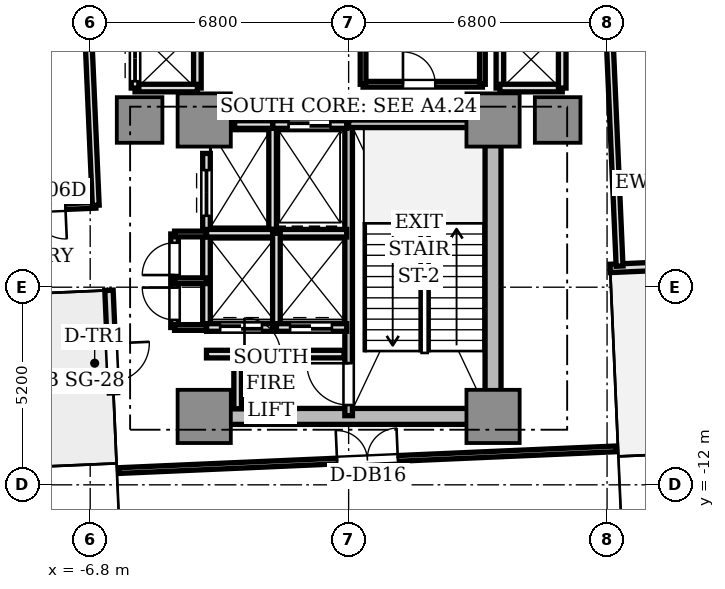
"""IFC4 building model, lengths in metres.
Left out: names, types, materials, properties, quantities, classifications, styles, units other than length and angle.
Written with IfcOpenShell. Run it as: python <this file> out.ifc"""

import sys

from ifc_helpers import new_model, si_unit, direction, frame, frame_2d, origin, origin_2d, place, context, subcontext, project, spatial, rectangle, extrude, source, transform, mapped, element, fill, save


model = new_model("IFC4")
c1 = context("Model", 3, precision=1e-05, world=origin(), true_north=direction((0.0, 1.0)))
c2 = subcontext(c1, "Body", "Model", "MODEL_VIEW")
j1 = project(units=[si_unit("LENGTHUNIT", "METRE"), si_unit("PLANEANGLEUNIT", "RADIAN")], contexts=[c1])
p1 = place(None, origin())
s1 = spatial("IfcSite", under=j1, at=p1, CompositionType="ELEMENT")
p2 = place(p1, origin())
s2 = spatial("IfcBuilding", under=s1, at=p2, CompositionType="ELEMENT")
p3 = place(p2, frame((0.0, 0.0, 106.95)))
s3 = spatial("IfcBuildingStorey", under=s2, at=p3, CompositionType="ELEMENT", Elevation=106.95)
p4 = place(p3, frame((-3.55, -10.2, 0.0), z_axis=(0.0, 0.0, 1.0), x_axis=(1.0, 0.0, 0.0)))
e1 = element("IfcWall", 1, at=p4, inside=s3, PredefinedType="SHEAR", context=c2, shape_type="SweptSolid", body=[
    extrude(rectangle(XDim=7.1, YDim=0.42, at=frame_2d((3.55, 0.0))), origin(), (0.0, 0.0, 1.0), 4.26),
])
p5 = place(p3, frame((3.8, -9.75, 0.0), z_axis=(0.0, 0.0, 1.0), x_axis=(0.0, 1.0, 0.0)))
e2 = element("IfcWall", 2, at=p5, inside=s3, PredefinedType="SHEAR", context=c2, shape_type="SweptSolid", body=[
    extrude(rectangle(XDim=6.9, YDim=0.42, at=frame_2d((3.45, 0.0))), origin(), (0.0, 0.0, 1.0), 4.26),
])
m1 = source(origin(), c2, "Body", "SweptSolid", [
    extrude(rectangle(XDim=1.4, YDim=1.4, at=origin_2d()), origin(), (0.0, 0.0, 1.0), 4.26),
])
for number, where, z_axis, x_axis in (
    (3, (-3.8, -2.4, 0.0), (0.0, 0.0, 1.0), (1.0, 0.0, 0.0)),
    (4, (3.8, -2.4, 0.0), (0.0, 0.0, 1.0), (1.0, 0.0, 0.0)),
    (5, (-3.8, -10.2, 0.0), (0.0, 0.0, 1.0), (1.0, 0.0, 0.0)),
    (6, (3.8, -10.2, 0.0), (0.0, 0.0, 1.0), (1.0, 0.0, 0.0)),
):
    element("IfcColumn", number, at=place(p3, frame(where, z_axis=z_axis, x_axis=x_axis)), inside=s3, PredefinedType="COLUMN", context=c2, shape_type="MappedRepresentation", body=[
        mapped(m1, transform((0.0, 0.0, 0.0), scale=1.0)),
    ])
m2 = source(origin(), c2, "Body", "SweptSolid", [
    extrude(rectangle(XDim=1.2, YDim=1.2, at=origin_2d()), origin(), (0.0, 0.0, 1.0), 4.26),
])
for number, where, z_axis, x_axis in (
    (7, (5.5, -2.4, 0.0), (0.0, 0.0, 1.0), (1.0, 0.0, 0.0)),
    (8, (-5.5, -2.4, 0.0), (0.0, 0.0, 1.0), (1.0, 0.0, 0.0)),
):
    element("IfcColumn", number, at=place(p3, frame(where, z_axis=z_axis, x_axis=x_axis)), inside=s3, PredefinedType="COLUMN", context=c2, shape_type="MappedRepresentation", body=[
        mapped(m2, transform((0.0, 0.0, 0.0), scale=1.0)),
    ])
p6 = place(p3, frame((6.882, -6.306, 0.0), z_axis=(0.0, 0.0, 1.0), x_axis=(0.999045894436, 0.043672655174, 0.0)))
e9 = element("IfcWall", 9, at=p6, inside=s3, PredefinedType="STANDARD", context=c2, shape_type="SweptSolid", body=[
    extrude(rectangle(XDim=2.7, YDim=0.22, at=frame_2d((1.35, 0.0))), origin(), (0.0, 0.0, 1.0), 4.26),
])
p7 = place(p6, frame((1.4, 0.0, 0.0)))
e10 = element("IfcOpeningElement", 10, at=p7, cuts=e9, PredefinedType="OPENING", context=c2, shape_type="SweptSolid", body=[
    extrude(rectangle(XDim=1.0, YDim=2.2, at=frame_2d((0.5, 1.1))), frame((0.0, 0.12, 0.0), z_axis=(0.0, -1.0, 0.0), x_axis=(1.0, 0.0, 0.0)), (0.0, 0.0, 1.0), 0.24),
])
p8 = place(p3, frame((-6.306, -6.882, 0.0), z_axis=(0.0, 0.0, 1.0), x_axis=(0.043672655174, -0.999045894436, 0.0)))
e11 = element("IfcWall", 11, at=p8, inside=s3, PredefinedType="STANDARD", context=c2, shape_type="SweptSolid", body=[
    extrude(rectangle(XDim=2.7, YDim=0.22, at=frame_2d((1.35, 0.0))), origin(), (0.0, 0.0, 1.0), 4.26),
])
p9 = place(p8, frame((1.4, 0.0, 0.0)))
e12 = element("IfcOpeningElement", 12, at=p9, cuts=e11, PredefinedType="OPENING", context=c2, shape_type="SweptSolid", body=[
    extrude(rectangle(XDim=1.0, YDim=2.2, at=frame_2d((0.5, 1.1))), frame((0.0, 0.12, 0.0), z_axis=(0.0, -1.0, 0.0), x_axis=(1.0, 0.0, 0.0)), (0.0, 0.0, 1.0), 0.24),
])
p10 = place(p3, frame((0.0, -10.18, 0.0), z_axis=(0.0, 0.0, 1.0), x_axis=(0.0, 1.0, 0.0)))
e13 = element("IfcWall", 13, at=p10, inside=s3, PredefinedType="SOLIDWALL", context=c2, shape_type="SweptSolid", body=[
    extrude(rectangle(XDim=7.68, YDim=0.2, at=frame_2d((3.84, 0.0))), origin(), (0.0, 0.0, 1.0), 4.26),
])
p11 = place(p10, frame((0.28, 0.0, 0.0)))
e14 = element("IfcOpeningElement", 14, at=p11, cuts=e13, PredefinedType="OPENING", context=c2, shape_type="SweptSolid", body=[
    extrude(rectangle(XDim=1.1, YDim=2.15, at=frame_2d((0.55, 1.075))), frame((0.0, 0.11, 0.0), z_axis=(0.0, -1.0, 0.0), x_axis=(1.0, 0.0, 0.0)), (0.0, 0.0, 1.0), 0.22),
])
p12 = place(p3, frame((0.0, -2.5, 0.0), z_axis=(0.0, 0.0, 1.0), x_axis=(1.0, 0.0, 0.0)))
e15 = element("IfcWall", 15, at=p12, inside=s3, PredefinedType="SOLIDWALL", context=c2, shape_type="SweptSolid", body=[
    extrude(rectangle(XDim=3.72, YDim=0.2, at=frame_2d((1.86, 0.0))), origin(), (0.0, 0.0, 1.0), 4.26),
])
p13 = place(p3, frame((-2.0, -5.28, 0.0), z_axis=(0.0, 0.0, 1.0), x_axis=(0.0, 1.0, 0.0)))
e16 = element("IfcWall", 16, at=p13, inside=s3, PredefinedType="SOLIDWALL", context=c2, shape_type="SweptSolid", body=[
    extrude(rectangle(XDim=2.78, YDim=0.2, at=frame_2d((1.39, 0.0))), origin(), (0.0, 0.0, 1.0), 3.81),
])
p14 = place(p3, frame((-2.0, -2.52, 0.0), z_axis=(0.0, 0.0, 1.0), x_axis=(1.0, 0.0, 0.0)))
e17 = element("IfcWall", 17, at=p14, inside=s3, PredefinedType="SOLIDWALL", context=c2, shape_type="SweptSolid", body=[
    extrude(rectangle(XDim=1.95, YDim=0.2, at=frame_2d((0.975, 0.0))), origin(), (0.0, 0.0, 1.0), 3.81),
])
p15 = place(p14, frame((0.42, 0.0, 0.0)))
e18 = element("IfcOpeningElement", 18, at=p15, cuts=e17, PredefinedType="OPENING", context=c2, shape_type="SweptSolid", body=[
    extrude(rectangle(XDim=1.1, YDim=2.2, at=frame_2d((0.55, 1.1))), frame((0.0, 0.11, 0.0), z_axis=(0.0, -1.0, 0.0), x_axis=(1.0, 0.0, 0.0)), (0.0, 0.0, 1.0), 0.22),
])
p16 = place(p3, frame((-3.0, -2.52, 0.0), z_axis=(0.0, 0.0, 1.0), x_axis=(1.0, 0.0, 0.0)))
e19 = element("IfcWall", 19, at=p16, inside=s3, PredefinedType="SOLIDWALL", context=c2, shape_type="SweptSolid", body=[
    extrude(rectangle(XDim=1.0, YDim=0.2, at=frame_2d((0.5, 0.0))), origin(), (0.0, 0.0, 1.0), 3.81),
])
p17 = place(p3, frame((-3.74, -5.36, 0.0), z_axis=(0.0, 0.0, 1.0), x_axis=(0.0, 1.0, 0.0)))
e20 = element("IfcWall", 20, at=p17, inside=s3, PredefinedType="SOLIDWALL", context=c2, shape_type="SweptSolid", body=[
    extrude(rectangle(XDim=2.08, YDim=0.2, at=frame_2d((1.04, 0.0))), origin(), (0.0, 0.0, 1.0), 3.81),
])
p18 = place(p17, frame((0.44, 0.0, 0.0)))
e21 = element("IfcOpeningElement", 21, at=p18, cuts=e20, PredefinedType="OPENING", context=c2, shape_type="SweptSolid", body=[
    extrude(rectangle(XDim=1.2, YDim=2.2, at=frame_2d((0.6, 1.1))), frame((0.0, 0.11, 0.0), z_axis=(0.0, -1.0, 0.0), x_axis=(1.0, 0.0, 0.0)), (0.0, 0.0, 1.0), 0.22),
])
p19 = place(p3, frame((-3.74, -7.86, 0.0), z_axis=(0.0, 0.0, 1.0), x_axis=(0.0, 1.0, 0.0)))
e22 = element("IfcWall", 22, at=p19, inside=s3, PredefinedType="SOLIDWALL", context=c2, shape_type="SweptSolid", body=[
    extrude(rectangle(XDim=2.48, YDim=0.2, at=frame_2d((1.24, 0.0))), origin(), (0.0, 0.0, 1.0), 3.81),
])
p20 = place(p3, frame((-3.74, -7.86, 0.0), z_axis=(0.0, 0.0, 1.0), x_axis=(1.0, 0.0, 0.0)))
e23 = element("IfcWall", 23, at=p20, inside=s3, PredefinedType="SOLIDWALL", context=c2, shape_type="SweptSolid", body=[
    extrude(rectangle(XDim=1.84, YDim=0.2, at=frame_2d((0.92, 0.0))), origin(), (0.0, 0.0, 1.0), 3.81),
])
p21 = place(p20, frame((0.36, 0.0, 0.0)))
e24 = element("IfcOpeningElement", 24, at=p21, cuts=e23, PredefinedType="OPENING", context=c2, shape_type="SweptSolid", body=[
    extrude(rectangle(XDim=1.1, YDim=2.2, at=frame_2d((0.55, 1.1))), frame((0.0, 0.11, 0.0), z_axis=(0.0, -1.0, 0.0), x_axis=(1.0, 0.0, 0.0)), (0.0, 0.0, 1.0), 0.22),
])
p22 = place(p3, frame((-3.74, -5.38, 0.0), z_axis=(0.0, 0.0, 1.0), x_axis=(1.0, 0.0, 0.0)))
e25 = element("IfcWall", 25, at=p22, inside=s3, PredefinedType="SOLIDWALL", context=c2, shape_type="SweptSolid", body=[
    extrude(rectangle(XDim=3.69, YDim=0.2, at=frame_2d((1.845, 0.0))), origin(), (0.0, 0.0, 1.0), 3.81),
])
p23 = place(p3, frame((-1.9, -7.86, 0.0), z_axis=(0.0, 0.0, 1.0), x_axis=(0.0, 1.0, 0.0)))
e26 = element("IfcWall", 26, at=p23, inside=s3, PredefinedType="SOLIDWALL", context=c2, shape_type="SweptSolid", body=[
    extrude(rectangle(XDim=2.48, YDim=0.2, at=frame_2d((1.24, 0.0))), origin(), (0.0, 0.0, 1.0), 3.81),
])
p24 = place(p3, frame((-1.9, -7.86, 0.0), z_axis=(0.0, 0.0, 1.0), x_axis=(1.0, 0.0, 0.0)))
e27 = element("IfcWall", 27, at=p24, inside=s3, PredefinedType="SOLIDWALL", context=c2, shape_type="SweptSolid", body=[
    extrude(rectangle(XDim=1.85, YDim=0.2, at=frame_2d((0.925, 0.0))), origin(), (0.0, 0.0, 1.0), 3.81),
])
p25 = place(p24, frame((0.36, 0.0, 0.0)))
e28 = element("IfcOpeningElement", 28, at=p25, cuts=e27, PredefinedType="OPENING", context=c2, shape_type="SweptSolid", body=[
    extrude(rectangle(XDim=1.1, YDim=2.2, at=frame_2d((0.55, 1.1))), frame((0.0, 0.11, 0.0), z_axis=(0.0, -1.0, 0.0), x_axis=(1.0, 0.0, 0.0)), (0.0, 0.0, 1.0), 0.22),
])
p26 = place(p3, frame((3.98, -1.56, 0.0), z_axis=(0.0, 0.0, 1.0), x_axis=(0.0, 1.0, 0.0)))
e29 = element("IfcWall", 29, at=p26, inside=s3, PredefinedType="SOLIDWALL", context=c2, shape_type="SweptSolid", body=[
    extrude(rectangle(XDim=3.12, YDim=0.2, at=frame_2d((1.56, 0.0))), origin(), (0.0, 0.0, 1.0), 3.43),
])
p27 = place(p3, frame((3.98, -1.56, 0.0), z_axis=(0.0, 0.0, 1.0), x_axis=(1.0, 0.0, 0.0)))
e30 = element("IfcWall", 30, at=p27, inside=s3, PredefinedType="SOLIDWALL", context=c2, shape_type="SweptSolid", body=[
    extrude(rectangle(XDim=1.64, YDim=0.2, at=frame_2d((0.82, 0.0))), origin(), (0.0, 0.0, 1.0), 3.81),
])
p28 = place(p3, frame((5.62, -1.56, 0.0), z_axis=(0.0, 0.0, 1.0), x_axis=(0.0, 1.0, 0.0)))
e31 = element("IfcWall", 31, at=p28, inside=s3, PredefinedType="SOLIDWALL", context=c2, shape_type="SweptSolid", body=[
    extrude(rectangle(XDim=1.56, YDim=0.2, at=frame_2d((0.78, 0.0))), origin(), (0.0, 0.0, 1.0), 3.81),
])
p29 = place(p3, frame((-3.98, -1.56, 0.0), z_axis=(0.0, 0.0, 1.0), x_axis=(0.0, 1.0, 0.0)))
e32 = element("IfcWall", 32, at=p29, inside=s3, PredefinedType="SOLIDWALL", context=c2, shape_type="SweptSolid", body=[
    extrude(rectangle(XDim=3.12, YDim=0.2, at=frame_2d((1.56, 0.0))), origin(), (0.0, 0.0, 1.0), 3.43),
])
p30 = place(p3, frame((-5.62, -1.56, 0.0), z_axis=(0.0, 0.0, 1.0), x_axis=(1.0, 0.0, 0.0)))
e33 = element("IfcWall", 33, at=p30, inside=s3, PredefinedType="SOLIDWALL", context=c2, shape_type="SweptSolid", body=[
    extrude(rectangle(XDim=1.64, YDim=0.2, at=frame_2d((0.82, 0.0))), origin(), (0.0, 0.0, 1.0), 3.81),
])
p31 = place(p3, frame((-5.62, -1.56, 0.0), z_axis=(0.0, 0.0, 1.0), x_axis=(0.0, 1.0, 0.0)))
e34 = element("IfcWall", 34, at=p31, inside=s3, PredefinedType="SOLIDWALL", context=c2, shape_type="SweptSolid", body=[
    extrude(rectangle(XDim=1.56, YDim=0.2, at=frame_2d((0.78, 0.0))), origin(), (0.0, 0.0, 1.0), 3.81),
])
p32 = place(p31, frame((0.18, 0.0, 0.0)))
e35 = element("IfcOpeningElement", 35, at=p32, cuts=e34, PredefinedType="OPENING", context=c2, shape_type="SweptSolid", body=[
    extrude(rectangle(XDim=1.2, YDim=2.2, at=frame_2d((0.6, 1.1))), frame((0.0, 0.11, 0.0), z_axis=(0.0, -1.0, 0.0), x_axis=(1.0, 0.0, 0.0)), (0.0, 0.0, 1.0), 0.22),
])
p33 = place(p3, frame((-3.74, -8.56, 0.0), z_axis=(0.0, 0.0, 1.0), x_axis=(1.0, 0.0, 0.0)))
e36 = element("IfcWall", 36, at=p33, inside=s3, PredefinedType="SOLIDWALL", context=c2, shape_type="SweptSolid", body=[
    extrude(rectangle(XDim=3.62, YDim=0.2, at=frame_2d((1.81, 0.0))), origin(), (0.0, 0.0, 1.0), 3.81),
])
p34 = place(p33, frame((1.0, 0.0, 0.0)))
e37 = element("IfcOpeningElement", 37, at=p34, cuts=e36, PredefinedType="OPENING", context=c2, shape_type="SweptSolid", body=[
    extrude(rectangle(XDim=0.95, YDim=2.15, at=frame_2d((0.475, 1.075))), frame((0.0, 0.11, 0.0), z_axis=(0.0, -1.0, 0.0), x_axis=(1.0, 0.0, 0.0)), (0.0, 0.0, 1.0), 0.22),
])
p35 = place(p3, frame((-2.92, -10.0, 0.0), z_axis=(0.0, 0.0, 1.0), x_axis=(0.0, 1.0, 0.0)))
e38 = element("IfcWall", 38, at=p35, inside=s3, PredefinedType="SOLIDWALL", context=c2, shape_type="SweptSolid", body=[
    extrude(rectangle(XDim=1.44, YDim=0.2, at=frame_2d((0.72, 0.0))), origin(), (0.0, 0.0, 1.0), 3.81),
])
p36 = place(p3, frame((-4.58, -7.86, 0.0), z_axis=(0.0, 0.0, 1.0), x_axis=(0.0, 1.0, 0.0)))
e39 = element("IfcWall", 39, at=p36, inside=s3, PredefinedType="SOLIDWALL", context=c2, shape_type="SweptSolid", body=[
    extrude(rectangle(XDim=2.46, YDim=0.2, at=frame_2d((1.23, 0.0))), origin(), (0.0, 0.0, 1.0), 3.81),
])
p37 = place(p36, frame((0.2, 0.0, 0.0)))
e40 = element("IfcOpeningElement", 40, at=p37, cuts=e39, PredefinedType="OPENING", context=c2, shape_type="SweptSolid", body=[
    extrude(rectangle(XDim=0.85, YDim=2.1, at=frame_2d((0.425, 1.05))), frame((0.0, 0.11, 0.0), z_axis=(0.0, -1.0, 0.0), x_axis=(1.0, 0.0, 0.0)), (0.0, 0.0, 1.0), 0.22),
])
p38 = place(p36, frame((1.38, 0.0, 0.0)))
e41 = element("IfcOpeningElement", 41, at=p38, cuts=e39, PredefinedType="OPENING", context=c2, shape_type="SweptSolid", body=[
    extrude(rectangle(XDim=0.85, YDim=2.1, at=frame_2d((0.425, 1.05))), frame((0.0, 0.11, 0.0), z_axis=(0.0, -1.0, 0.0), x_axis=(1.0, 0.0, 0.0)), (0.0, 0.0, 1.0), 0.22),
])
for number, where, z_axis, x_axis in (
    (42, (-4.58, -5.4, 0.0), (0.0, 0.0, 1.0), (1.0, 0.0, 0.0)),
    (43, (-4.58, -7.86, 0.0), (0.0, 0.0, 1.0), (1.0, 0.0, 0.0)),
    (44, (-4.58, -6.63, 0.0), (0.0, 0.0, 1.0), (1.0, 0.0, 0.0)),
):
    element("IfcWall", number, at=place(p3, frame(where, z_axis=z_axis, x_axis=x_axis)), inside=s3, PredefinedType="PARTITIONING", context=c2, shape_type="SweptSolid", body=[
        extrude(rectangle(XDim=0.84, YDim=0.15, at=frame_2d((0.42, 0.0))), origin(), (0.0, 0.0, 1.0), 3.81),
    ])
p39 = place(p3, frame((0.38, -1.46, 0.0), z_axis=(0.0, 0.0, 1.0), x_axis=(1.0, 0.0, 0.0)))
e45 = element("IfcWall", 45, at=p39, inside=s3, PredefinedType="PARTITIONING", context=c2, shape_type="SweptSolid", body=[
    extrude(rectangle(XDim=3.14, YDim=0.15, at=frame_2d((1.57, 0.0))), origin(), (0.0, 0.0, 1.0), 3.81),
])
p40 = place(p39, frame((1.05, 0.0, 0.0)))
e46 = element("IfcOpeningElement", 46, at=p40, cuts=e45, PredefinedType="OPENING", context=c2, shape_type="SweptSolid", body=[
    extrude(rectangle(XDim=0.85, YDim=2.1, at=frame_2d((0.425, 1.05))), frame((0.0, 0.085, 0.0), z_axis=(0.0, -1.0, 0.0), x_axis=(1.0, 0.0, 0.0)), (0.0, 0.0, 1.0), 0.17),
])
p41 = place(p3, frame((0.38, -1.46, 0.0), z_axis=(0.0, 0.0, 1.0), x_axis=(0.0, 1.0, 0.0)))
e47 = element("IfcWall", 47, at=p41, inside=s3, PredefinedType="PARTITIONING", context=c2, shape_type="SweptSolid", body=[
    extrude(rectangle(XDim=1.36, YDim=0.15, at=frame_2d((0.68, 0.0))), origin(), (0.0, 0.0, 1.0), 3.81),
])
p42 = place(p3, frame((3.52, -1.46, 0.0), z_axis=(0.0, 0.0, 1.0), x_axis=(0.0, 1.0, 0.0)))
e48 = element("IfcWall", 48, at=p42, inside=s3, PredefinedType="PARTITIONING", context=c2, shape_type="SweptSolid", body=[
    extrude(rectangle(XDim=1.36, YDim=0.15, at=frame_2d((0.68, 0.0))), origin(), (0.0, 0.0, 1.0), 3.43),
])
p43 = place(p3, frame((7.129, -6.245, 0.0), z_axis=(0.0, 0.0, 1.0), x_axis=(-0.043600217373, 0.999049058378, 0.0)))
e49 = element("IfcWall", 49, at=p43, inside=s3, PredefinedType="PARTITIONING", context=c2, shape_type="SweptSolid", body=[
    extrude(rectangle(XDim=7.8, YDim=0.18, at=frame_2d((3.9, 0.0))), origin(), (0.0, 0.0, 1.0), 3.81),
])
p44 = place(p3, frame((-6.654, -4.645, 0.0), z_axis=(0.0, 0.0, 1.0), x_axis=(-0.999048925025, -0.043603272887, 0.0)))
e50 = element("IfcWall", 50, at=p44, inside=s3, PredefinedType="PARTITIONING", context=c2, shape_type="SweptSolid", body=[
    extrude(rectangle(XDim=8.55, YDim=0.15, at=frame_2d((4.275, 0.0))), origin(), (0.0, 0.0, 1.0), 3.78),
])
p45 = place(p44, frame((0.8, 0.0, 0.0)))
e51 = element("IfcOpeningElement", 51, at=p45, cuts=e50, PredefinedType="OPENING", context=c2, shape_type="SweptSolid", body=[
    extrude(rectangle(XDim=0.85, YDim=2.1, at=frame_2d((0.425, 1.05))), frame((0.0, 0.085, 0.0), z_axis=(0.0, -1.0, 0.0), x_axis=(1.0, 0.0, 0.0)), (0.0, 0.0, 1.0), 0.17),
])
p46 = place(p44, frame((4.1, 0.0, 0.0)))
e52 = element("IfcOpeningElement", 52, at=p46, cuts=e50, PredefinedType="OPENING", context=c2, shape_type="SweptSolid", body=[
    extrude(rectangle(XDim=0.85, YDim=2.1, at=frame_2d((0.425, 1.05))), frame((0.0, 0.085, 0.0), z_axis=(0.0, -1.0, 0.0), x_axis=(1.0, 0.0, 0.0)), (0.0, 0.0, 1.0), 0.17),
])
p47 = place(p3, frame((-7.129, 6.245, 0.0), z_axis=(0.0, 0.0, 1.0), x_axis=(0.043608291235, -0.999048705988, 0.0)))
e53 = element("IfcWall", 53, at=p47, inside=s3, PredefinedType="PARTITIONING", context=c2, shape_type="SweptSolid", body=[
    extrude(rectangle(XDim=10.9, YDim=0.18, at=frame_2d((5.45, 0.0))), origin(), (0.0, 0.0, 1.0), 3.81),
])
p48 = place(p3, frame((-6.049, -11.625, 0.0), z_axis=(0.0, 0.0, 1.0), x_axis=(0.999047806124, 0.043628901879, 0.0)))
e54 = element("IfcWall", 54, at=p48, inside=s3, PredefinedType="PARTITIONING", context=c2, shape_type="SweptSolid", body=[
    extrude(rectangle(XDim=13.1, YDim=0.15, at=frame_2d((6.55, 0.0))), origin(), (0.0, 0.0, 1.0), 3.81),
])
p49 = place(p48, frame((5.75, 0.0, 0.0)))
e55 = element("IfcOpeningElement", 55, at=p49, cuts=e54, PredefinedType="OPENING", context=c2, shape_type="SweptSolid", body=[
    extrude(rectangle(XDim=1.6, YDim=2.25, at=frame_2d((0.8, 1.125))), frame((0.0, 0.085, 0.0), z_axis=(0.0, -1.0, 0.0), x_axis=(1.0, 0.0, 0.0)), (0.0, 0.0, 1.0), 0.17),
])
m3 = source(origin(), c2, "Body", "SweptSolid", [
    extrude(rectangle(XDim=1.0, YDim=0.05, at=origin_2d()), origin(), (0.0, 0.0, 1.0), 2.2),
])
p50 = place(p9, frame((0.5, 0.0, 0.0)))
e56 = element("IfcDoor", 56, at=p50, inside=s3, OperationType="SINGLE_SWING_LEFT", PredefinedType="DOOR", context=c2, shape_type="MappedRepresentation", body=[
    mapped(m3, transform((0.0, 0.0, 0.0), scale=1.0)),
])
fill(e12, e56)
m4 = source(origin(), c2, "Body", "SweptSolid", [
    extrude(rectangle(XDim=1.1, YDim=0.05, at=origin_2d()), origin(), (0.0, 0.0, 1.0), 2.2),
])
p51 = place(p15, frame((0.55, 0.0, 0.0)))
e57 = element("IfcDoor", 57, at=p51, inside=s3, OperationType="DOUBLE_DOOR_SLIDING", PredefinedType="DOOR", context=c2, shape_type="MappedRepresentation", body=[
    mapped(m4, transform((0.0, 0.0, 0.0), scale=1.0)),
])
fill(e18, e57)
m5 = source(origin(), c2, "Body", "SweptSolid", [
    extrude(rectangle(XDim=1.2, YDim=0.05, at=origin_2d()), origin(), (0.0, 0.0, 1.0), 2.2),
])
p52 = place(p18, frame((0.6, 0.0, 0.0)))
e58 = element("IfcDoor", 58, at=p52, inside=s3, OperationType="DOUBLE_DOOR_SLIDING", PredefinedType="DOOR", context=c2, shape_type="MappedRepresentation", body=[
    mapped(m5, transform((0.0, 0.0, 0.0), scale=1.0)),
])
fill(e21, e58)
p53 = place(p21, frame((0.55, 0.0, 0.0)))
e59 = element("IfcDoor", 59, at=p53, inside=s3, OperationType="DOUBLE_DOOR_SLIDING", PredefinedType="DOOR", context=c2, shape_type="MappedRepresentation", body=[
    mapped(m4, transform((0.0, 0.0, 0.0), scale=1.0)),
])
fill(e24, e59)
p54 = place(p25, frame((0.55, 0.0, 0.0)))
e60 = element("IfcDoor", 60, at=p54, inside=s3, OperationType="DOUBLE_DOOR_SLIDING", PredefinedType="DOOR", context=c2, shape_type="MappedRepresentation", body=[
    mapped(m4, transform((0.0, 0.0, 0.0), scale=1.0)),
])
fill(e28, e60)
p55 = place(p32, frame((0.6, 0.0, 0.0)))
e61 = element("IfcDoor", 61, at=p55, inside=s3, OperationType="DOUBLE_DOOR_SLIDING", PredefinedType="DOOR", context=c2, shape_type="MappedRepresentation", body=[
    mapped(m5, transform((0.0, 0.0, 0.0), scale=1.0)),
])
fill(e35, e61)
m6 = source(origin(), c2, "Body", "SweptSolid", [
    extrude(rectangle(XDim=1.1, YDim=0.05, at=origin_2d()), origin(), (0.0, 0.0, 1.0), 2.15),
])
p56 = place(p11, frame((0.55, 0.0, 0.0)))
e62 = element("IfcDoor", 62, at=p56, inside=s3, OperationType="SINGLE_SWING_RIGHT", PredefinedType="DOOR", context=c2, shape_type="MappedRepresentation", body=[
    mapped(m6, transform((0.0, 0.0, 0.0), scale=1.0)),
])
fill(e14, e62)
m7 = source(origin(), c2, "Body", "SweptSolid", [
    extrude(rectangle(XDim=0.95, YDim=0.05, at=origin_2d()), origin(), (0.0, 0.0, 1.0), 2.15),
])
p57 = place(p34, frame((0.475, 0.0, 0.0)))
e63 = element("IfcDoor", 63, at=p57, inside=s3, OperationType="SINGLE_SWING_LEFT", PredefinedType="DOOR", context=c2, shape_type="MappedRepresentation", body=[
    mapped(m7, transform((0.0, 0.0, 0.0), scale=1.0)),
])
fill(e37, e63)
m8 = source(origin(), c2, "Body", "SweptSolid", [
    extrude(rectangle(XDim=0.85, YDim=0.05, at=origin_2d()), origin(), (0.0, 0.0, 1.0), 2.1),
])
p58 = place(p37, frame((0.425, 0.0, 0.0)))
e64 = element("IfcDoor", 64, at=p58, inside=s3, OperationType="SINGLE_SWING_RIGHT", PredefinedType="DOOR", context=c2, shape_type="MappedRepresentation", body=[
    mapped(m8, transform((0.0, 0.0, 0.0), scale=1.0)),
])
fill(e40, e64)
p59 = place(p38, frame((0.425, 0.0, 0.0)))
e65 = element("IfcDoor", 65, at=p59, inside=s3, OperationType="SINGLE_SWING_LEFT", PredefinedType="DOOR", context=c2, shape_type="MappedRepresentation", body=[
    mapped(m8, transform((0.0, 0.0, 0.0), scale=1.0)),
])
fill(e41, e65)
p60 = place(p40, frame((0.425, 0.0, 0.0)))
e66 = element("IfcDoor", 66, at=p60, inside=s3, OperationType="SINGLE_SWING_LEFT", PredefinedType="DOOR", context=c2, shape_type="MappedRepresentation", body=[
    mapped(m8, transform((0.0, 0.0, 0.0), scale=1.0)),
])
fill(e46, e66)
p61 = place(p45, frame((0.425, 0.0, 0.0)))
e67 = element("IfcDoor", 67, at=p61, inside=s3, OperationType="SINGLE_SWING_LEFT", PredefinedType="DOOR", context=c2, shape_type="MappedRepresentation", body=[
    mapped(m8, transform((0.0, 0.0, 0.0), scale=1.0)),
])
fill(e51, e67)
m9 = source(origin(), c2, "Body", "SweptSolid", [
    extrude(rectangle(XDim=1.6, YDim=0.05, at=origin_2d()), origin(), (0.0, 0.0, 1.0), 2.25),
])
p62 = place(p49, frame((0.8, 0.0, 0.0)))
e68 = element("IfcDoor", 68, at=p62, inside=s3, OperationType="DOUBLE_DOOR_SINGLE_SWING", PredefinedType="DOOR", context=c2, shape_type="MappedRepresentation", body=[
    mapped(m9, transform((0.0, 0.0, 0.0), scale=1.0)),
])
fill(e55, e68)
save(model, sys.argv[1])
